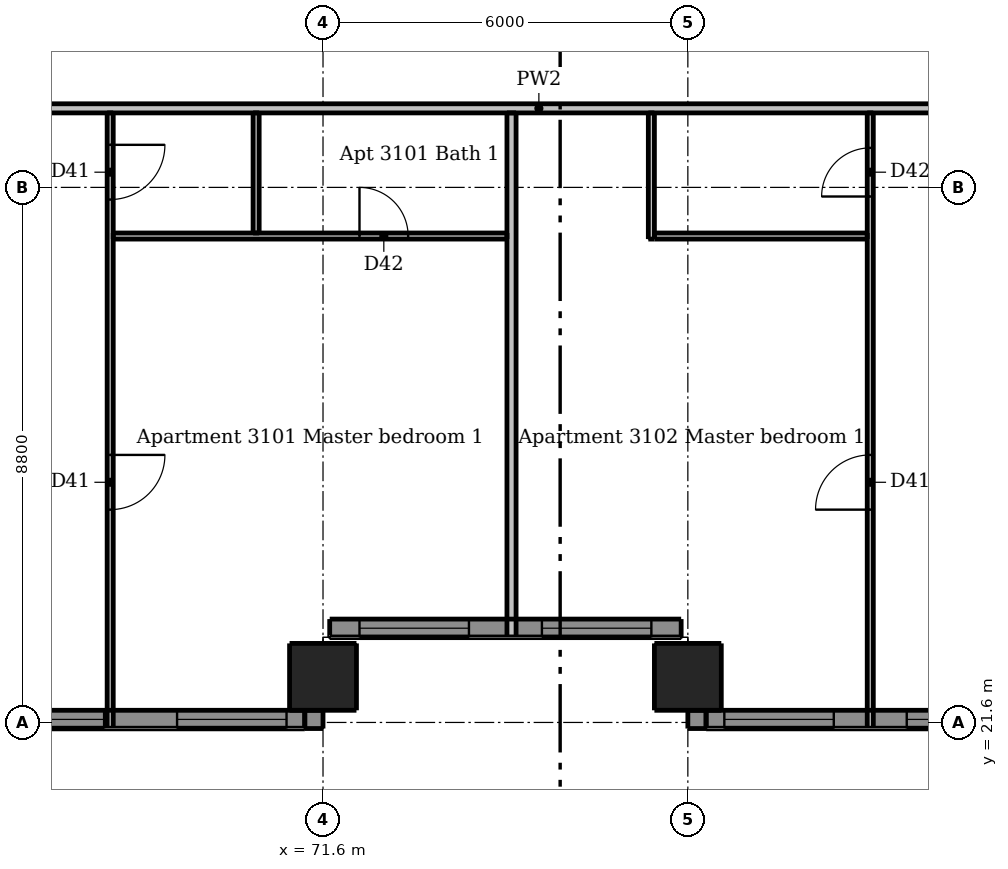
"""IFC4 building model, lengths in metres.
Left out: names, types, materials, properties, quantities, classifications, styles, units other than length and angle.
Written with IfcOpenShell. Run it as: python <this file> out.ifc"""

import sys

from ifc_helpers import new_model, si_unit, direction, frame, frame_2d, origin, origin_2d, place, context, subcontext, project, spatial, rectangle, extrude, element, fill, save


model = new_model("IFC4")
c1 = context("Model", 3, precision=1e-05, world=origin(), true_north=direction((0.0, 1.0)))
c2 = subcontext(c1, "Body", "Model", "MODEL_VIEW")
j1 = project(units=[si_unit("LENGTHUNIT", "METRE"), si_unit("PLANEANGLEUNIT", "RADIAN")], contexts=[c1])
p1 = place(None, origin())
s1 = spatial("IfcSite", under=j1, at=p1, CompositionType="ELEMENT")
p2 = place(p1, origin())
s2 = spatial("IfcBuilding", under=s1, at=p2, CompositionType="ELEMENT")
p3 = place(p2, frame((0.0, 0.0, 115.0)))
s3 = spatial("IfcBuildingStorey", under=s2, at=p3, CompositionType="ELEMENT", Elevation=115.0)
for number, where, z_axis, x_axis in (
    (1, (71.6, 22.35, 0.0), (0.0, 0.0, 1.0), (1.0, 0.0, 0.0)),
    (2, (77.6, 22.35, 0.0), (0.0, 0.0, 1.0), (1.0, 0.0, 0.0)),
):
    element("IfcColumn", number, at=place(p3, frame(where, z_axis=z_axis, x_axis=x_axis)), inside=s3, PredefinedType="COLUMN", context=c2, shape_type="SweptSolid", body=[
        extrude(rectangle(XDim=1.1, YDim=1.1, at=origin_2d()), origin(), (0.0, 0.0, 1.0), 3.05),
    ])
for number, where, z_axis, x_axis in (
    (3, (71.45, 21.5, 0.0), (0.0, 0.0, 1.0), (0.0, 1.0, 0.0)),
    (4, (77.75, 21.8, 0.0), (0.0, 0.0, 1.0), (0.0, -1.0, 0.0)),
):
    element("IfcWall", number, at=place(p3, frame(where, z_axis=z_axis, x_axis=x_axis)), inside=s3, PredefinedType="SOLIDWALL", context=c2, shape_type="SweptSolid", body=[
        extrude(rectangle(XDim=0.3, YDim=0.3, at=frame_2d((0.15, 0.0))), origin(), (0.0, 0.0, 1.0), 3.05),
    ])
p4 = place(p3, frame((65.6, 21.65, 0.0), z_axis=(0.0, 0.0, 1.0), x_axis=(1.0, 0.0, 0.0)))
e5 = element("IfcWall", 5, at=p4, inside=s3, PredefinedType="SOLIDWALL", context=c2, shape_type="SweptSolid", body=[
    extrude(rectangle(XDim=5.7, YDim=0.3, at=frame_2d((2.85, 0.0))), origin(), (0.0, 0.0, 1.0), 3.05),
])
p5 = place(p4, frame((0.6, 0.0, 0.15)))
e6 = element("IfcOpeningElement", 6, at=p5, cuts=e5, PredefinedType="OPENING", context=c2, shape_type="SweptSolid", body=[
    extrude(rectangle(XDim=1.8, YDim=2.1, at=frame_2d((0.9, 1.05))), frame((0.0, 0.16, 0.0), z_axis=(0.0, -1.0, 0.0), x_axis=(1.0, 0.0, 0.0)), (0.0, 0.0, 1.0), 0.32),
])
p6 = place(p4, frame((3.6, 0.0, 0.15)))
e7 = element("IfcOpeningElement", 7, at=p6, cuts=e5, PredefinedType="OPENING", context=c2, shape_type="SweptSolid", body=[
    extrude(rectangle(XDim=1.8, YDim=2.1, at=frame_2d((0.9, 1.05))), frame((0.0, 0.16, 0.0), z_axis=(0.0, -1.0, 0.0), x_axis=(1.0, 0.0, 0.0)), (0.0, 0.0, 1.0), 0.32),
])
p7 = place(p3, frame((71.71, 23.15, 0.0), z_axis=(0.0, 0.0, 1.0), x_axis=(1.0, 0.0, 0.0)))
e8 = element("IfcWall", 8, at=p7, inside=s3, PredefinedType="SOLIDWALL", context=c2, shape_type="SweptSolid", body=[
    extrude(rectangle(XDim=5.78, YDim=0.3, at=frame_2d((2.89, 0.0))), origin(), (0.0, 0.0, 1.0), 3.05),
])
p8 = place(p7, frame((0.49, 0.0, 0.15)))
e9 = element("IfcOpeningElement", 9, at=p8, cuts=e8, PredefinedType="OPENING", context=c2, shape_type="SweptSolid", body=[
    extrude(rectangle(XDim=1.8, YDim=2.1, at=frame_2d((0.9, 1.05))), frame((0.0, 0.16, 0.0), z_axis=(0.0, -1.0, 0.0), x_axis=(1.0, 0.0, 0.0)), (0.0, 0.0, 1.0), 0.32),
])
p9 = place(p7, frame((3.49, 0.0, 0.15)))
e10 = element("IfcOpeningElement", 10, at=p9, cuts=e8, PredefinedType="OPENING", context=c2, shape_type="SweptSolid", body=[
    extrude(rectangle(XDim=1.8, YDim=2.1, at=frame_2d((0.9, 1.05))), frame((0.0, 0.16, 0.0), z_axis=(0.0, -1.0, 0.0), x_axis=(1.0, 0.0, 0.0)), (0.0, 0.0, 1.0), 0.32),
])
p10 = place(p3, frame((77.9, 21.65, 0.0), z_axis=(0.0, 0.0, 1.0), x_axis=(1.0, 0.0, 0.0)))
e11 = element("IfcWall", 11, at=p10, inside=s3, PredefinedType="SOLIDWALL", context=c2, shape_type="SweptSolid", body=[
    extrude(rectangle(XDim=5.4, YDim=0.3, at=frame_2d((2.7, 0.0))), origin(), (0.0, 0.0, 1.0), 3.05),
])
p11 = place(p10, frame((0.3, 0.0, 0.15)))
e12 = element("IfcOpeningElement", 12, at=p11, cuts=e11, PredefinedType="OPENING", context=c2, shape_type="SweptSolid", body=[
    extrude(rectangle(XDim=1.8, YDim=2.1, at=frame_2d((0.9, 1.05))), frame((0.0, 0.16, 0.0), z_axis=(0.0, -1.0, 0.0), x_axis=(1.0, 0.0, 0.0)), (0.0, 0.0, 1.0), 0.32),
])
p12 = place(p10, frame((3.3, 0.0, 0.15)))
e13 = element("IfcOpeningElement", 13, at=p12, cuts=e11, PredefinedType="OPENING", context=c2, shape_type="SweptSolid", body=[
    extrude(rectangle(XDim=1.8, YDim=2.1, at=frame_2d((0.9, 1.05))), frame((0.0, 0.16, 0.0), z_axis=(0.0, -1.0, 0.0), x_axis=(1.0, 0.0, 0.0)), (0.0, 0.0, 1.0), 0.32),
])
p13 = place(p3, frame((68.1, 31.625, 0.0), z_axis=(0.0, 0.0, 1.0), x_axis=(0.0, -1.0, 0.0)))
e14 = element("IfcWall", 14, at=p13, inside=s3, PredefinedType="PARTITIONING", context=c2, shape_type="SweptSolid", body=[
    extrude(rectangle(XDim=10.125, YDim=0.1, at=frame_2d((5.062, 0.0))), origin(), (0.0, 0.0, 1.0), 3.05),
])
p14 = place(p13, frame((0.525, 0.0, 0.0)))
e15 = element("IfcOpeningElement", 15, at=p14, cuts=e14, PredefinedType="OPENING", context=c2, shape_type="SweptSolid", body=[
    extrude(rectangle(XDim=0.9, YDim=2.1, at=frame_2d((0.45, 1.05))), frame((0.0, 0.06, 0.0), z_axis=(0.0, -1.0, 0.0), x_axis=(1.0, 0.0, 0.0)), (0.0, 0.0, 1.0), 0.12),
])
p15 = place(p13, frame((5.625, 0.0, 0.0)))
e16 = element("IfcOpeningElement", 16, at=p15, cuts=e14, PredefinedType="OPENING", context=c2, shape_type="SweptSolid", body=[
    extrude(rectangle(XDim=0.9, YDim=2.1, at=frame_2d((0.45, 1.05))), frame((0.0, 0.06, 0.0), z_axis=(0.0, -1.0, 0.0), x_axis=(1.0, 0.0, 0.0)), (0.0, 0.0, 1.0), 0.12),
])
p16 = place(p3, frame((70.5, 29.65, 0.0), z_axis=(0.0, 0.0, 1.0), x_axis=(0.0, 1.0, 0.0)))
e17 = element("IfcWall", 17, at=p16, inside=s3, PredefinedType="PARTITIONING", context=c2, shape_type="SweptSolid", body=[
    extrude(rectangle(XDim=1.975, YDim=0.1, at=frame_2d((0.988, 0.0))), origin(), (0.0, 0.0, 1.0), 3.05),
])
p17 = place(p3, frame((77.0, 29.55, 0.0), z_axis=(0.0, 0.0, 1.0), x_axis=(0.0, 1.0, 0.0)))
e18 = element("IfcWall", 18, at=p17, inside=s3, PredefinedType="PARTITIONING", context=c2, shape_type="SweptSolid", body=[
    extrude(rectangle(XDim=2.075, YDim=0.1, at=frame_2d((1.038, 0.0))), origin(), (0.0, 0.0, 1.0), 3.05),
])
p18 = place(p3, frame((80.6, 21.5, 0.0), z_axis=(0.0, 0.0, 1.0), x_axis=(0.0, 1.0, 0.0)))
e19 = element("IfcWall", 19, at=p18, inside=s3, PredefinedType="PARTITIONING", context=c2, shape_type="SweptSolid", body=[
    extrude(rectangle(XDim=10.125, YDim=0.1, at=frame_2d((5.062, 0.0))), origin(), (0.0, 0.0, 1.0), 3.05),
])
p19 = place(p18, frame((3.6, 0.0, 0.0)))
e20 = element("IfcOpeningElement", 20, at=p19, cuts=e19, PredefinedType="OPENING", context=c2, shape_type="SweptSolid", body=[
    extrude(rectangle(XDim=0.9, YDim=2.1, at=frame_2d((0.45, 1.05))), frame((0.0, 0.06, 0.0), z_axis=(0.0, -1.0, 0.0), x_axis=(1.0, 0.0, 0.0)), (0.0, 0.0, 1.0), 0.12),
])
p20 = place(p18, frame((8.75, 0.0, 0.0)))
e21 = element("IfcOpeningElement", 21, at=p20, cuts=e19, PredefinedType="OPENING", context=c2, shape_type="SweptSolid", body=[
    extrude(rectangle(XDim=0.8, YDim=2.1, at=frame_2d((0.4, 1.05))), frame((0.0, 0.06, 0.0), z_axis=(0.0, -1.0, 0.0), x_axis=(1.0, 0.0, 0.0)), (0.0, 0.0, 1.0), 0.12),
])
p21 = place(p3, frame((68.15, 29.6, 0.0), z_axis=(0.0, 0.0, 1.0), x_axis=(1.0, 0.0, 0.0)))
e22 = element("IfcWall", 22, at=p21, inside=s3, PredefinedType="PARTITIONING", context=c2, shape_type="SweptSolid", body=[
    extrude(rectangle(XDim=6.475, YDim=0.1, at=frame_2d((3.238, 0.0))), origin(), (0.0, 0.0, 1.0), 3.05),
])
p22 = place(p21, frame((4.05, 0.0, 0.0)))
e23 = element("IfcOpeningElement", 23, at=p22, cuts=e22, PredefinedType="OPENING", context=c2, shape_type="SweptSolid", body=[
    extrude(rectangle(XDim=0.8, YDim=2.1, at=frame_2d((0.4, 1.05))), frame((0.0, 0.06, 0.0), z_axis=(0.0, -1.0, 0.0), x_axis=(1.0, 0.0, 0.0)), (0.0, 0.0, 1.0), 0.12),
])
p23 = place(p3, frame((77.05, 29.6, 0.0), z_axis=(0.0, 0.0, 1.0), x_axis=(1.0, 0.0, 0.0)))
e24 = element("IfcWall", 24, at=p23, inside=s3, PredefinedType="PARTITIONING", context=c2, shape_type="SweptSolid", body=[
    extrude(rectangle(XDim=3.5, YDim=0.1, at=frame_2d((1.75, 0.0))), origin(), (0.0, 0.0, 1.0), 3.05),
])
p24 = place(p3, frame((74.7, 23.0, 0.0), z_axis=(0.0, 0.0, 1.0), x_axis=(0.0, 1.0, 0.0)))
e25 = element("IfcWall", 25, at=p24, inside=s3, PredefinedType="PARTITIONING", context=c2, shape_type="SweptSolid", body=[
    extrude(rectangle(XDim=8.625, YDim=0.15, at=frame_2d((4.312, 0.0))), origin(), (0.0, 0.0, 1.0), 3.05),
])
p25 = place(p3, frame((89.525, 31.7, 0.0), z_axis=(0.0, 0.0, 1.0), x_axis=(-1.0, 0.0, 0.0)))
e26 = element("IfcWall", 26, at=p25, inside=s3, PredefinedType="PARTITIONING", context=c2, shape_type="SweptSolid", body=[
    extrude(rectangle(XDim=28.75, YDim=0.15, at=frame_2d((14.375, 0.0))), origin(), (0.0, 0.0, 1.0), 3.05),
])
p26 = place(p25, frame((24.625, 0.0, 0.0)))
e27 = element("IfcOpeningElement", 27, at=p26, cuts=e26, PredefinedType="OPENING", context=c2, shape_type="SweptSolid", body=[
    extrude(rectangle(XDim=1.0, YDim=2.1, at=frame_2d((0.5, 1.05))), frame((0.0, 0.085, 0.0), z_axis=(0.0, -1.0, 0.0), x_axis=(1.0, 0.0, 0.0)), (0.0, 0.0, 1.0), 0.17),
])
p27 = place(p25, frame((5.425, 0.0, 0.0)))
e28 = element("IfcOpeningElement", 28, at=p27, cuts=e26, PredefinedType="OPENING", context=c2, shape_type="SweptSolid", body=[
    extrude(rectangle(XDim=1.0, YDim=2.1, at=frame_2d((0.5, 1.05))), frame((0.0, 0.085, 0.0), z_axis=(0.0, -1.0, 0.0), x_axis=(1.0, 0.0, 0.0)), (0.0, 0.0, 1.0), 0.17),
])
p28 = place(p5, origin())
e29 = element("IfcWindow", 29, at=p28, inside=s3, PartitioningType="DOUBLE_PANEL_VERTICAL", PredefinedType="WINDOW", context=c2, shape_type="SweptSolid", body=[
    extrude(rectangle(XDim=1.8, YDim=2.1, at=frame_2d((0.9, 1.05))), frame((0.0, 0.03, 0.0), z_axis=(0.0, -1.0, 0.0), x_axis=(1.0, 0.0, 0.0)), (0.0, 0.0, 1.0), 0.06),
])
fill(e6, e29)
p29 = place(p6, origin())
e30 = element("IfcWindow", 30, at=p29, inside=s3, PartitioningType="DOUBLE_PANEL_VERTICAL", PredefinedType="WINDOW", context=c2, shape_type="SweptSolid", body=[
    extrude(rectangle(XDim=1.8, YDim=2.1, at=frame_2d((0.9, 1.05))), frame((0.0, 0.03, 0.0), z_axis=(0.0, -1.0, 0.0), x_axis=(1.0, 0.0, 0.0)), (0.0, 0.0, 1.0), 0.06),
])
fill(e7, e30)
p30 = place(p8, origin())
e31 = element("IfcWindow", 31, at=p30, inside=s3, PartitioningType="DOUBLE_PANEL_VERTICAL", PredefinedType="WINDOW", context=c2, shape_type="SweptSolid", body=[
    extrude(rectangle(XDim=1.8, YDim=2.1, at=frame_2d((0.9, 1.05))), frame((0.0, 0.03, 0.0), z_axis=(0.0, -1.0, 0.0), x_axis=(1.0, 0.0, 0.0)), (0.0, 0.0, 1.0), 0.06),
])
fill(e9, e31)
p31 = place(p9, origin())
e32 = element("IfcWindow", 32, at=p31, inside=s3, PartitioningType="DOUBLE_PANEL_VERTICAL", PredefinedType="WINDOW", context=c2, shape_type="SweptSolid", body=[
    extrude(rectangle(XDim=1.8, YDim=2.1, at=frame_2d((0.9, 1.05))), frame((0.0, 0.03, 0.0), z_axis=(0.0, -1.0, 0.0), x_axis=(1.0, 0.0, 0.0)), (0.0, 0.0, 1.0), 0.06),
])
fill(e10, e32)
p32 = place(p11, origin())
e33 = element("IfcWindow", 33, at=p32, inside=s3, PartitioningType="DOUBLE_PANEL_VERTICAL", PredefinedType="WINDOW", context=c2, shape_type="SweptSolid", body=[
    extrude(rectangle(XDim=1.8, YDim=2.1, at=frame_2d((0.9, 1.05))), frame((0.0, 0.03, 0.0), z_axis=(0.0, -1.0, 0.0), x_axis=(1.0, 0.0, 0.0)), (0.0, 0.0, 1.0), 0.06),
])
fill(e12, e33)
p33 = place(p12, origin())
e34 = element("IfcWindow", 34, at=p33, inside=s3, PartitioningType="DOUBLE_PANEL_VERTICAL", PredefinedType="WINDOW", context=c2, shape_type="SweptSolid", body=[
    extrude(rectangle(XDim=1.8, YDim=2.1, at=frame_2d((0.9, 1.05))), frame((0.0, 0.03, 0.0), z_axis=(0.0, -1.0, 0.0), x_axis=(1.0, 0.0, 0.0)), (0.0, 0.0, 1.0), 0.06),
])
fill(e13, e34)
p34 = place(p14, origin())
e35 = element("IfcDoor", 35, at=p34, inside=s3, OperationType="SINGLE_SWING_LEFT", PredefinedType="DOOR", context=c2, shape_type="SweptSolid", body=[
    extrude(rectangle(XDim=0.9, YDim=2.1, at=frame_2d((0.45, 1.05))), frame((0.0, 0.025, 0.0), z_axis=(0.0, -1.0, 0.0), x_axis=(1.0, 0.0, 0.0)), (0.0, 0.0, 1.0), 0.05),
])
fill(e15, e35)
p35 = place(p15, origin())
e36 = element("IfcDoor", 36, at=p35, inside=s3, OperationType="SINGLE_SWING_LEFT", PredefinedType="DOOR", context=c2, shape_type="SweptSolid", body=[
    extrude(rectangle(XDim=0.9, YDim=2.1, at=frame_2d((0.45, 1.05))), frame((0.0, 0.025, 0.0), z_axis=(0.0, -1.0, 0.0), x_axis=(1.0, 0.0, 0.0)), (0.0, 0.0, 1.0), 0.05),
])
fill(e16, e36)
p36 = place(p22, origin())
e37 = element("IfcDoor", 37, at=p36, inside=s3, OperationType="SINGLE_SWING_LEFT", PredefinedType="DOOR", context=c2, shape_type="SweptSolid", body=[
    extrude(rectangle(XDim=0.8, YDim=2.1, at=frame_2d((0.4, 1.05))), frame((0.0, 0.025, 0.0), z_axis=(0.0, -1.0, 0.0), x_axis=(1.0, 0.0, 0.0)), (0.0, 0.0, 1.0), 0.05),
])
fill(e23, e37)
p37 = place(p19, origin())
e38 = element("IfcDoor", 38, at=p37, inside=s3, OperationType="SINGLE_SWING_LEFT", PredefinedType="DOOR", context=c2, shape_type="SweptSolid", body=[
    extrude(rectangle(XDim=0.9, YDim=2.1, at=frame_2d((0.45, 1.05))), frame((0.0, 0.025, 0.0), z_axis=(0.0, -1.0, 0.0), x_axis=(1.0, 0.0, 0.0)), (0.0, 0.0, 1.0), 0.05),
])
fill(e20, e38)
p38 = place(p20, origin())
e39 = element("IfcDoor", 39, at=p38, inside=s3, OperationType="SINGLE_SWING_LEFT", PredefinedType="DOOR", context=c2, shape_type="SweptSolid", body=[
    extrude(rectangle(XDim=0.8, YDim=2.1, at=frame_2d((0.4, 1.05))), frame((0.0, 0.025, 0.0), z_axis=(0.0, -1.0, 0.0), x_axis=(1.0, 0.0, 0.0)), (0.0, 0.0, 1.0), 0.05),
])
fill(e21, e39)
save(model, sys.argv[1])
